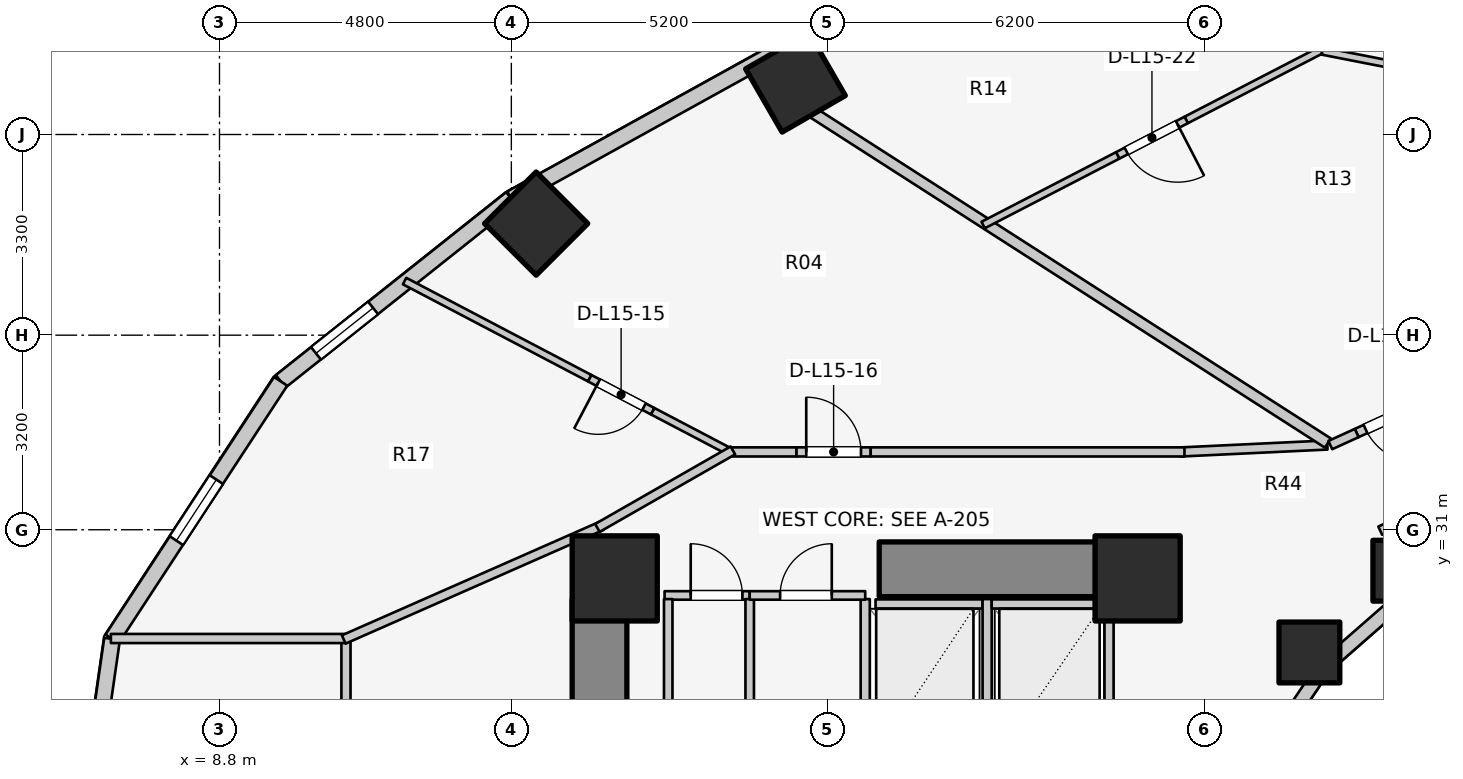
"""IFC4 building model, lengths in metres.
Left out: names, types, materials, properties, quantities, classifications, styles, units other than length and angle.
Written with IfcOpenShell. Run it as: python <this file> out.ifc"""

import sys

from ifc_helpers import new_model, si_unit, direction, frame, frame_2d, origin, origin_2d, place, context, subcontext, project, spatial, rectangle, extrude, element, fill, save


model = new_model("IFC4")
c1 = context("Model", 3, precision=1e-05, world=origin(), true_north=direction((0.0, 1.0)))
c2 = subcontext(c1, "Body", "Model", "MODEL_VIEW")
j1 = project(units=[si_unit("LENGTHUNIT", "METRE"), si_unit("PLANEANGLEUNIT", "RADIAN")], contexts=[c1])
p1 = place(None, origin())
s1 = spatial("IfcSite", under=j1, at=p1, CompositionType="ELEMENT")
p2 = place(p1, origin())
s2 = spatial("IfcBuilding", under=s1, at=p2, CompositionType="ELEMENT")
p3 = place(p2, frame((0.0, 0.0, 52.4)))
s3 = spatial("IfcBuildingStorey", under=s2, at=p3, CompositionType="ELEMENT", Elevation=52.4)
p4 = place(p3, frame((15.05, 17.05, 0.0), z_axis=(0.0, 0.0, 1.0), x_axis=(0.0, 1.0, 0.0)))
e1 = element("IfcWall", 1, at=p4, inside=s3, PredefinedType="SHEAR", context=c2, shape_type="SweptSolid", body=[
    extrude(rectangle(XDim=12.8, YDim=0.9, at=frame_2d((6.4, 0.0))), origin(), (0.0, 0.0, 1.0), 3.1),
])
p5 = place(p3, frame((19.65, 30.35, 0.0), z_axis=(0.0, 0.0, 1.0), x_axis=(1.0, 0.0, 0.0)))
e2 = element("IfcWall", 2, at=p5, inside=s3, PredefinedType="SHEAR", context=c2, shape_type="SweptSolid", body=[
    extrude(rectangle(XDim=4.5, YDim=0.9, at=frame_2d((2.25, 0.0))), origin(), (0.0, 0.0, 1.0), 3.1),
])
for number, where, z_axis, x_axis in (
    (3, (23.9, 30.2, 0.0), (0.0, 0.0, 1.0), (1.0, 0.0, 0.0)),
    (4, (15.3, 30.2, 0.0), (0.0, 0.0, 1.0), (1.0, 0.0, 0.0)),
):
    element("IfcColumn", number, at=place(p3, frame(where, z_axis=z_axis, x_axis=x_axis)), inside=s3, PredefinedType="COLUMN", context=c2, shape_type="SweptSolid", body=[
        extrude(rectangle(XDim=1.4, YDim=1.4, at=origin_2d()), origin(), (0.0, 0.0, 1.0), 3.1),
    ])
p6 = place(p3, frame((28.27, 30.327, 0.0), z_axis=(0.0, 0.0, 1.0), x_axis=(1.0, 0.0, 0.0)))
e5 = element("IfcColumn", 5, at=p6, inside=s3, PredefinedType="COLUMN", context=c2, shape_type="SweptSolid", body=[
    extrude(rectangle(XDim=1.0, YDim=1.0, at=origin_2d()), origin(), (0.0, 0.0, 1.0), 3.1),
])
p7 = place(p3, frame((18.273, 38.359, 0.0), z_axis=(0.0, 0.0, 1.0), x_axis=(-0.5, 0.866025403784, 0.0)))
e6 = element("IfcColumn", 6, at=p7, inside=s3, PredefinedType="COLUMN", context=c2, shape_type="SweptSolid", body=[
    extrude(rectangle(XDim=1.2, YDim=1.2, at=origin_2d()), origin(), (0.0, 0.0, 1.0), 3.1),
])
p8 = place(p3, frame((26.725, 28.982, 0.0), z_axis=(0.0, 0.0, 1.0), x_axis=(1.0, 0.0, 0.0)))
e7 = element("IfcColumn", 7, at=p8, inside=s3, PredefinedType="COLUMN", context=c2, shape_type="SweptSolid", body=[
    extrude(rectangle(XDim=1.0, YDim=1.0, at=origin_2d()), origin(), (0.0, 0.0, 1.0), 3.1),
])
p9 = place(p3, frame((14.008, 36.035, 0.0), z_axis=(0.0, 0.0, 1.0), x_axis=(-0.707106781187, 0.707106781187, 0.0)))
e8 = element("IfcColumn", 8, at=p9, inside=s3, PredefinedType="COLUMN", context=c2, shape_type="SweptSolid", body=[
    extrude(rectangle(XDim=1.2, YDim=1.2, at=origin_2d()), origin(), (0.0, 0.0, 1.0), 3.1),
])
p10 = place(p3, frame((28.44, 30.032, 0.0), z_axis=(0.0, 0.0, 1.0), x_axis=(-0.752576694707, -0.658504607869, 0.0)))
e9 = element("IfcWall", 9, at=p10, inside=s3, PredefinedType="STANDARD", context=c2, shape_type="SweptSolid", body=[
    extrude(rectangle(XDim=1.959, YDim=0.23, at=frame_2d((0.98, 0.0))), origin(), (0.0, 0.0, 1.0), 1.22),
])
p11 = place(p3, frame((26.965, 28.742, 0.0), z_axis=(0.0, 0.0, 1.0), x_axis=(-0.558197800898, -0.829707909492, 0.0)))
e10 = element("IfcWall", 10, at=p11, inside=s3, PredefinedType="STANDARD", context=c2, shape_type="SweptSolid", body=[
    extrude(rectangle(XDim=2.027, YDim=0.23, at=frame_2d((1.013, 0.0))), origin(), (0.0, 0.0, 1.0), 1.22),
])
p12 = place(p3, frame((17.958, 38.862, 0.0), z_axis=(0.0, 0.0, 1.0), x_axis=(-0.875137303239, -0.483874674352, 0.0)))
e11 = element("IfcWall", 11, at=p12, inside=s3, PredefinedType="STANDARD", context=c2, shape_type="SweptSolid", body=[
    extrude(rectangle(XDim=4.985, YDim=0.26, at=frame_2d((2.493, 0.0))), origin(), (0.0, 0.0, 1.0), 1.22),
])
p13 = place(p3, frame((13.595, 36.45, 0.0), z_axis=(0.0, 0.0, 1.0), x_axis=(-0.783123133379, -0.621866672179, 0.0)))
e12 = element("IfcWall", 12, at=p13, inside=s3, PredefinedType="STANDARD", context=c2, shape_type="SweptSolid", body=[
    extrude(rectangle(XDim=4.839, YDim=0.26, at=frame_2d((2.419, 0.0))), origin(), (0.0, 0.0, 1.0), 1.22),
])
p14 = place(p13, frame((2.898, 0.0, 0.15)))
e13 = element("IfcOpeningElement", 13, at=p14, cuts=e12, PredefinedType="OPENING", context=c2, shape_type="SweptSolid", body=[
    extrude(rectangle(XDim=1.2, YDim=0.9, at=frame_2d((0.6, 0.45))), frame((0.0, 0.14, 0.0), z_axis=(0.0, -1.0, 0.0), x_axis=(1.0, 0.0, 0.0)), (0.0, 0.0, 1.0), 0.28),
])
p15 = place(p3, frame((9.806, 33.441, 0.0), z_axis=(0.0, 0.0, 1.0), x_axis=(-0.547702757047, -0.836672988642, 0.0)))
e14 = element("IfcWall", 14, at=p15, inside=s3, PredefinedType="STANDARD", context=c2, shape_type="SweptSolid", body=[
    extrude(rectangle(XDim=5.062, YDim=0.26, at=frame_2d((2.531, 0.0))), origin(), (0.0, 0.0, 1.0), 1.22),
])
p16 = place(p15, frame((1.931, 0.0, 0.15)))
e15 = element("IfcOpeningElement", 15, at=p16, cuts=e14, PredefinedType="OPENING", context=c2, shape_type="SweptSolid", body=[
    extrude(rectangle(XDim=1.2, YDim=0.9, at=frame_2d((0.6, 0.45))), frame((0.0, 0.14, 0.0), z_axis=(0.0, -1.0, 0.0), x_axis=(1.0, 0.0, 0.0)), (0.0, 0.0, 1.0), 0.28),
])
p17 = place(p3, frame((7.033, 29.205, 0.0), z_axis=(0.0, 0.0, 1.0), x_axis=(-0.142528001686, -0.989790770181, 0.0)))
e16 = element("IfcWall", 16, at=p17, inside=s3, PredefinedType="STANDARD", context=c2, shape_type="SweptSolid", body=[
    extrude(rectangle(XDim=6.269, YDim=0.26, at=frame_2d((3.135, 0.0))), origin(), (0.0, 0.0, 1.0), 2.57),
])
p18 = place(p17, frame((2.385, 0.0, 0.75)))
e17 = element("IfcOpeningElement", 17, at=p18, cuts=e16, PredefinedType="OPENING", context=c2, shape_type="SweptSolid", body=[
    extrude(rectangle(XDim=1.5, YDim=1.6, at=frame_2d((0.75, 0.8))), frame((0.0, 0.14, 0.0), z_axis=(0.0, -1.0, 0.0), x_axis=(1.0, 0.0, 0.0)), (0.0, 0.0, 1.0), 0.28),
])
p19 = place(p3, frame((19.59, 29.78, 0.0), z_axis=(0.0, 0.0, 1.0), x_axis=(1.0, 0.0, 0.0)))
e18 = element("IfcWall", 18, at=p19, inside=s3, PredefinedType="SOLIDWALL", context=c2, shape_type="SweptSolid", body=[
    extrude(rectangle(XDim=1.76, YDim=0.15, at=frame_2d((0.88, 0.0))), origin(), (0.0, 0.0, 1.0), 2.575),
])
for number, where, z_axis, x_axis in (
    (19, (19.42, 27.14, 0.0), (0.0, 0.0, 1.0), (0.0, 1.0, 0.0)),
    (20, (21.425, 27.14, 0.0), (0.0, 0.0, 1.0), (0.0, 1.0, 0.0)),
):
    element("IfcWall", number, at=place(p3, frame(where, z_axis=z_axis, x_axis=x_axis)), inside=s3, PredefinedType="SOLIDWALL", context=c2, shape_type="SweptSolid", body=[
        extrude(rectangle(XDim=2.72, YDim=0.15, at=frame_2d((1.36, 0.0))), origin(), (0.0, 0.0, 1.0), 2.575),
    ])
p20 = place(p3, frame((21.5, 29.78, 0.0), z_axis=(0.0, 0.0, 1.0), x_axis=(1.0, 0.0, 0.0)))
e21 = element("IfcWall", 21, at=p20, inside=s3, PredefinedType="SOLIDWALL", context=c2, shape_type="SweptSolid", body=[
    extrude(rectangle(XDim=1.76, YDim=0.15, at=frame_2d((0.88, 0.0))), origin(), (0.0, 0.0, 1.0), 2.575),
])
p21 = place(p3, frame((23.43, 27.14, 0.0), z_axis=(0.0, 0.0, 1.0), x_axis=(0.0, 1.0, 0.0)))
e22 = element("IfcWall", 22, at=p21, inside=s3, PredefinedType="SOLIDWALL", context=c2, shape_type="SweptSolid", body=[
    extrude(rectangle(XDim=2.72, YDim=0.15, at=frame_2d((1.36, 0.0))), origin(), (0.0, 0.0, 1.0), 2.575),
])
p22 = place(p3, frame((16.12, 29.92, 0.0), z_axis=(0.0, 0.0, 1.0), x_axis=(1.0, 0.0, 0.0)))
e23 = element("IfcWall", 23, at=p22, inside=s3, PredefinedType="PLUMBINGWALL", context=c2, shape_type="SweptSolid", body=[
    extrude(rectangle(XDim=1.4, YDim=0.14, at=frame_2d((0.7, 0.0))), origin(), (0.0, 0.0, 1.0), 2.575),
])
p23 = place(p22, frame((0.43, 0.0, 0.0)))
e24 = element("IfcOpeningElement", 24, at=p23, cuts=e23, PredefinedType="OPENING", context=c2, shape_type="SweptSolid", body=[
    extrude(rectangle(XDim=0.85, YDim=2.05, at=frame_2d((0.425, 1.025))), frame((0.0, 0.08, 0.0), z_axis=(0.0, -1.0, 0.0), x_axis=(1.0, 0.0, 0.0)), (0.0, 0.0, 1.0), 0.16),
])
for number, where, z_axis, x_axis in (
    (25, (16.18, 25.98, 0.0), (0.0, 0.0, 1.0), (0.0, 1.0, 0.0)),
    (26, (17.52, 25.98, 0.0), (0.0, 0.0, 1.0), (0.0, 1.0, 0.0)),
):
    element("IfcWall", number, at=place(p3, frame(where, z_axis=z_axis, x_axis=x_axis)), inside=s3, PredefinedType="PLUMBINGWALL", context=c2, shape_type="SweptSolid", body=[
        extrude(rectangle(XDim=3.88, YDim=0.14, at=frame_2d((1.94, 0.0))), origin(), (0.0, 0.0, 1.0), 2.575),
    ])
p24 = place(p3, frame((17.52, 29.92, 0.0), z_axis=(0.0, 0.0, 1.0), x_axis=(1.0, 0.0, 0.0)))
e27 = element("IfcWall", 27, at=p24, inside=s3, PredefinedType="PLUMBINGWALL", context=c2, shape_type="SweptSolid", body=[
    extrude(rectangle(XDim=1.9, YDim=0.14, at=frame_2d((0.95, 0.0))), origin(), (0.0, 0.0, 1.0), 2.575),
])
p25 = place(p24, frame((0.5, 0.0, 0.0)))
e28 = element("IfcOpeningElement", 28, at=p25, cuts=e27, PredefinedType="OPENING", context=c2, shape_type="SweptSolid", body=[
    extrude(rectangle(XDim=0.85, YDim=2.05, at=frame_2d((0.425, 1.025))), frame((0.0, 0.08, 0.0), z_axis=(0.0, -1.0, 0.0), x_axis=(1.0, 0.0, 0.0)), (0.0, 0.0, 1.0), 0.16),
])
p26 = place(p3, frame((29.873, 31.906, 0.0), z_axis=(0.0, 0.0, 1.0), x_axis=(-0.906943449489, -0.421252393975, 0.0)))
e29 = element("IfcWall", 29, at=p26, inside=s3, PredefinedType="PARTITIONING", context=c2, shape_type="SweptSolid", body=[
    extrude(rectangle(XDim=2.186, YDim=0.15, at=frame_2d((1.093, 0.0))), origin(), (0.0, 0.0, 1.0), 1.957),
])
p27 = place(p3, frame((10.88, 16.748, 0.0), z_axis=(0.0, 0.0, 1.0), x_axis=(0.0, 1.0, 0.0)))
e30 = element("IfcWall", 30, at=p27, inside=s3, PredefinedType="PARTITIONING", context=c2, shape_type="SweptSolid", body=[
    extrude(rectangle(XDim=12.503, YDim=0.15, at=frame_2d((6.252, 0.0))), origin(), (0.0, 0.0, 1.0), 2.12),
])
p28 = place(p3, frame((7.014, 29.212, 0.0), z_axis=(0.0, 0.0, 1.0), x_axis=(1.0, 0.0, 0.0)))
e31 = element("IfcWall", 31, at=p28, inside=s3, PredefinedType="PARTITIONING", context=c2, shape_type="SweptSolid", body=[
    extrude(rectangle(XDim=3.866, YDim=0.15, at=frame_2d((1.933, 0.0))), origin(), (0.0, 0.0, 1.0), 2.575),
])
p29 = place(p3, frame((10.844, 29.196, 0.0), z_axis=(0.0, 0.0, 1.0), x_axis=(0.91502756289, 0.403391322604, 0.0)))
e32 = element("IfcWall", 32, at=p29, inside=s3, PredefinedType="PARTITIONING", context=c2, shape_type="SweptSolid", body=[
    extrude(rectangle(XDim=4.637, YDim=0.15, at=frame_2d((2.319, 0.0))), origin(), (0.0, 0.0, 1.0), 1.22),
])
p30 = place(p3, frame((17.244, 32.257, 0.0), z_axis=(0.0, 0.0, 1.0), x_axis=(-0.885552742751, 0.464538846391, 0.0)))
e33 = element("IfcWall", 33, at=p30, inside=s3, PredefinedType="MOVABLE", context=c2, shape_type="SweptSolid", body=[
    extrude(rectangle(XDim=1.492, YDim=0.12, at=frame_2d((0.746, 0.0))), origin(), (0.0, 0.0, 1.0), 2.575),
])
p31 = place(p3, frame((15.923, 32.95, 0.0), z_axis=(0.0, 0.0, 1.0), x_axis=(-0.885533150024, 0.464576194191, 0.0)))
e34 = element("IfcWall", 34, at=p31, inside=s3, PredefinedType="MOVABLE", context=c2, shape_type="SweptSolid", body=[
    extrude(rectangle(XDim=1.17, YDim=0.12, at=frame_2d((0.585, 0.0))), origin(), (0.0, 0.0, 1.0), 2.11),
])
p32 = place(p31, frame((0.16, 0.0, 0.0)))
e35 = element("IfcOpeningElement", 35, at=p32, cuts=e34, PredefinedType="OPENING", context=c2, shape_type="SweptSolid", body=[
    extrude(rectangle(XDim=0.85, YDim=2.05, at=frame_2d((0.425, 1.025))), frame((0.0, 0.07, 0.0), z_axis=(0.0, -1.0, 0.0), x_axis=(1.0, 0.0, 0.0)), (0.0, 0.0, 1.0), 0.14),
])
p33 = place(p3, frame((14.887, 33.493, 0.0), z_axis=(0.0, 0.0, 1.0), x_axis=(-0.885561599533, 0.464521962271, 0.0)))
e36 = element("IfcWall", 36, at=p33, inside=s3, PredefinedType="MOVABLE", context=c2, shape_type="SweptSolid", body=[
    extrude(rectangle(XDim=3.436, YDim=0.12, at=frame_2d((1.718, 0.0))), origin(), (0.0, 0.0, 1.0), 1.22),
])
p34 = place(p3, frame((27.02, 32.394, 0.0), z_axis=(0.0, 0.0, 1.0), x_axis=(-0.998877427952, -0.047369651964, 0.0)))
e37 = element("IfcWall", 37, at=p34, inside=s3, PredefinedType="PARTITIONING", context=c2, shape_type="SweptSolid", body=[
    extrude(rectangle(XDim=2.433, YDim=0.15, at=frame_2d((1.216, 0.0))), origin(), (0.0, 0.0, 1.0), 1.957),
])
p35 = place(p3, frame((17.15, 32.28, 0.0), z_axis=(0.0, 0.0, 1.0), x_axis=(1.0, 0.0, 0.0)))
e38 = element("IfcWall", 38, at=p35, inside=s3, PredefinedType="PARTITIONING", context=c2, shape_type="SweptSolid", body=[
    extrude(rectangle(XDim=1.14, YDim=0.15, at=frame_2d((0.57, 0.0))), origin(), (0.0, 0.0, 1.0), 2.575),
])
p36 = place(p3, frame((18.29, 32.28, 0.0), z_axis=(0.0, 0.0, 1.0), x_axis=(1.0, 0.0, 0.0)))
e39 = element("IfcWall", 39, at=p36, inside=s3, PredefinedType="PARTITIONING", context=c2, shape_type="SweptSolid", body=[
    extrude(rectangle(XDim=1.22, YDim=0.15, at=frame_2d((0.61, 0.0))), origin(), (0.0, 0.0, 1.0), 2.575),
])
p37 = place(p36, frame((0.16, 0.0, 0.0)))
e40 = element("IfcOpeningElement", 40, at=p37, cuts=e39, PredefinedType="OPENING", context=c2, shape_type="SweptSolid", body=[
    extrude(rectangle(XDim=0.9, YDim=2.1, at=frame_2d((0.45, 1.05))), frame((0.0, 0.085, 0.0), z_axis=(0.0, -1.0, 0.0), x_axis=(1.0, 0.0, 0.0)), (0.0, 0.0, 1.0), 0.17),
])
p38 = place(p3, frame((19.51, 32.28, 0.0), z_axis=(0.0, 0.0, 1.0), x_axis=(1.0, 0.0, 0.0)))
e41 = element("IfcWall", 41, at=p38, inside=s3, PredefinedType="PARTITIONING", context=c2, shape_type="SweptSolid", body=[
    extrude(rectangle(XDim=5.16, YDim=0.15, at=frame_2d((2.58, 0.0))), origin(), (0.0, 0.0, 1.0), 1.957),
])
p39 = place(p3, frame((17.243, 32.305, 0.0), z_axis=(0.0, 0.0, 1.0), x_axis=(-0.867991349648, -0.496579315857, 0.0)))
e42 = element("IfcWall", 42, at=p39, inside=s3, PredefinedType="PARTITIONING", context=c2, shape_type="SweptSolid", body=[
    extrude(rectangle(XDim=2.567, YDim=0.15, at=frame_2d((1.283, 0.0))), origin(), (0.0, 0.0, 1.0), 1.22),
])
p40 = place(p3, frame((27.029, 32.426, 0.0), z_axis=(0.0, 0.0, 1.0), x_axis=(-0.841689919529, 0.5399611832, 0.0)))
e43 = element("IfcWall", 43, at=p40, inside=s3, PredefinedType="PARTITIONING", context=c2, shape_type="SweptSolid", body=[
    extrude(rectangle(XDim=10.058, YDim=0.18, at=frame_2d((5.029, 0.0))), origin(), (0.0, 0.0, 1.0), 1.957),
])
p41 = place(p3, frame((32.049, 37.871, 0.0), z_axis=(0.0, 0.0, 1.0), x_axis=(-0.981343325718, 0.192263561471, 0.0)))
e44 = element("IfcWall", 44, at=p41, inside=s3, PredefinedType="MOVABLE", context=c2, shape_type="SweptSolid", body=[
    extrude(rectangle(XDim=5.255, YDim=0.12, at=frame_2d((2.627, 0.0))), origin(), (0.0, 0.0, 1.0), 1.957),
])
p42 = place(p3, frame((26.911, 38.884, 0.0), z_axis=(0.0, 0.0, 1.0), x_axis=(-0.888145903538, -0.459561588939, 0.0)))
e45 = element("IfcWall", 45, at=p42, inside=s3, PredefinedType="MOVABLE", context=c2, shape_type="SweptSolid", body=[
    extrude(rectangle(XDim=2.49, YDim=0.12, at=frame_2d((1.245, 0.0))), origin(), (0.0, 0.0, 1.0), 1.957),
])
p43 = place(p3, frame((24.699, 37.74, 0.0), z_axis=(0.0, 0.0, 1.0), x_axis=(-0.888190589687, -0.459475218474, 0.0)))
e46 = element("IfcWall", 46, at=p43, inside=s3, PredefinedType="MOVABLE", context=c2, shape_type="SweptSolid", body=[
    extrude(rectangle(XDim=1.27, YDim=0.12, at=frame_2d((0.635, 0.0))), origin(), (0.0, 0.0, 1.0), 2.575),
])
p44 = place(p43, frame((0.16, 0.0, 0.0)))
e47 = element("IfcOpeningElement", 47, at=p44, cuts=e46, PredefinedType="OPENING", context=c2, shape_type="SweptSolid", body=[
    extrude(rectangle(XDim=0.95, YDim=2.1, at=frame_2d((0.475, 1.05))), frame((0.0, 0.07, 0.0), z_axis=(0.0, -1.0, 0.0), x_axis=(1.0, 0.0, 0.0)), (0.0, 0.0, 1.0), 0.14),
])
p45 = place(p3, frame((23.572, 37.156, 0.0), z_axis=(0.0, 0.0, 1.0), x_axis=(-0.888145903538, -0.459561588939, 0.0)))
e48 = element("IfcWall", 48, at=p45, inside=s3, PredefinedType="MOVABLE", context=c2, shape_type="SweptSolid", body=[
    extrude(rectangle(XDim=2.49, YDim=0.12, at=frame_2d((1.245, 0.0))), origin(), (0.0, 0.0, 1.0), 1.957),
])
p46 = place(p3, frame((28.658, 33.118, 0.0), z_axis=(0.0, 0.0, 1.0), x_axis=(-0.909812681416, -0.415019137794, 0.0)))
e49 = element("IfcWall", 49, at=p46, inside=s3, PredefinedType="PARTITIONING", context=c2, shape_type="SweptSolid", body=[
    extrude(rectangle(XDim=1.27, YDim=0.15, at=frame_2d((0.635, 0.0))), origin(), (0.0, 0.0, 1.0), 2.16),
])
p47 = place(p46, frame((0.16, 0.0, 0.0)))
e50 = element("IfcOpeningElement", 50, at=p47, cuts=e49, PredefinedType="OPENING", context=c2, shape_type="SweptSolid", body=[
    extrude(rectangle(XDim=0.95, YDim=2.1, at=frame_2d((0.475, 1.05))), frame((0.0, 0.085, 0.0), z_axis=(0.0, -1.0, 0.0), x_axis=(1.0, 0.0, 0.0)), (0.0, 0.0, 1.0), 0.17),
])
p48 = place(p3, frame((27.503, 32.591, 0.0), z_axis=(0.0, 0.0, 1.0), x_axis=(-0.909645934478, -0.415384489224, 0.0)))
e51 = element("IfcWall", 51, at=p48, inside=s3, PredefinedType="PARTITIONING", context=c2, shape_type="SweptSolid", body=[
    extrude(rectangle(XDim=0.477, YDim=0.15, at=frame_2d((0.238, 0.0))), origin(), (0.0, 0.0, 1.0), 2.575),
])
p49 = place(p14, origin())
e52 = element("IfcWindow", 52, at=p49, inside=s3, PartitioningType="SINGLE_PANEL", PredefinedType="WINDOW", context=c2, shape_type="SweptSolid", body=[
    extrude(rectangle(XDim=1.2, YDim=0.9, at=frame_2d((0.6, 0.45))), frame((0.0, 0.03, 0.0), z_axis=(0.0, -1.0, 0.0), x_axis=(1.0, 0.0, 0.0)), (0.0, 0.0, 1.0), 0.06),
])
fill(e13, e52)
p50 = place(p16, origin())
e53 = element("IfcWindow", 53, at=p50, inside=s3, PartitioningType="SINGLE_PANEL", PredefinedType="WINDOW", context=c2, shape_type="SweptSolid", body=[
    extrude(rectangle(XDim=1.2, YDim=0.9, at=frame_2d((0.6, 0.45))), frame((0.0, 0.03, 0.0), z_axis=(0.0, -1.0, 0.0), x_axis=(1.0, 0.0, 0.0)), (0.0, 0.0, 1.0), 0.06),
])
fill(e15, e53)
p51 = place(p23, origin())
e54 = element("IfcDoor", 54, at=p51, inside=s3, OperationType="SINGLE_SWING_LEFT", PredefinedType="DOOR", context=c2, shape_type="SweptSolid", body=[
    extrude(rectangle(XDim=0.85, YDim=2.05, at=frame_2d((0.425, 1.025))), frame((0.0, 0.025, 0.0), z_axis=(0.0, -1.0, 0.0), x_axis=(1.0, 0.0, 0.0)), (0.0, 0.0, 1.0), 0.05),
])
fill(e24, e54)
p52 = place(p25, origin())
e55 = element("IfcDoor", 55, at=p52, inside=s3, OperationType="SINGLE_SWING_RIGHT", PredefinedType="DOOR", context=c2, shape_type="SweptSolid", body=[
    extrude(rectangle(XDim=0.85, YDim=2.05, at=frame_2d((0.425, 1.025))), frame((0.0, 0.025, 0.0), z_axis=(0.0, -1.0, 0.0), x_axis=(1.0, 0.0, 0.0)), (0.0, 0.0, 1.0), 0.05),
])
fill(e28, e55)
p53 = place(p32, origin())
e56 = element("IfcDoor", 56, at=p53, inside=s3, OperationType="SINGLE_SWING_RIGHT", PredefinedType="DOOR", context=c2, shape_type="SweptSolid", body=[
    extrude(rectangle(XDim=0.85, YDim=2.05, at=frame_2d((0.425, 1.025))), frame((0.0, 0.025, 0.0), z_axis=(0.0, -1.0, 0.0), x_axis=(1.0, 0.0, 0.0)), (0.0, 0.0, 1.0), 0.05),
])
fill(e35, e56)
p54 = place(p37, origin())
e57 = element("IfcDoor", 57, at=p54, inside=s3, OperationType="SINGLE_SWING_LEFT", PredefinedType="DOOR", context=c2, shape_type="SweptSolid", body=[
    extrude(rectangle(XDim=0.9, YDim=2.1, at=frame_2d((0.45, 1.05))), frame((0.0, 0.025, 0.0), z_axis=(0.0, -1.0, 0.0), x_axis=(1.0, 0.0, 0.0)), (0.0, 0.0, 1.0), 0.05),
])
fill(e40, e57)
p55 = place(p44, origin())
e58 = element("IfcDoor", 58, at=p55, inside=s3, OperationType="SINGLE_SWING_LEFT", PredefinedType="DOOR", context=c2, shape_type="SweptSolid", body=[
    extrude(rectangle(XDim=0.95, YDim=2.1, at=frame_2d((0.475, 1.05))), frame((0.0, 0.025, 0.0), z_axis=(0.0, -1.0, 0.0), x_axis=(1.0, 0.0, 0.0)), (0.0, 0.0, 1.0), 0.05),
])
fill(e47, e58)
p56 = place(p47, origin())
e59 = element("IfcDoor", 59, at=p56, inside=s3, OperationType="SINGLE_SWING_LEFT", PredefinedType="DOOR", context=c2, shape_type="SweptSolid", body=[
    extrude(rectangle(XDim=0.95, YDim=2.1, at=frame_2d((0.475, 1.05))), frame((0.0, 0.025, 0.0), z_axis=(0.0, -1.0, 0.0), x_axis=(1.0, 0.0, 0.0)), (0.0, 0.0, 1.0), 0.05),
])
fill(e50, e59)
save(model, sys.argv[1])
